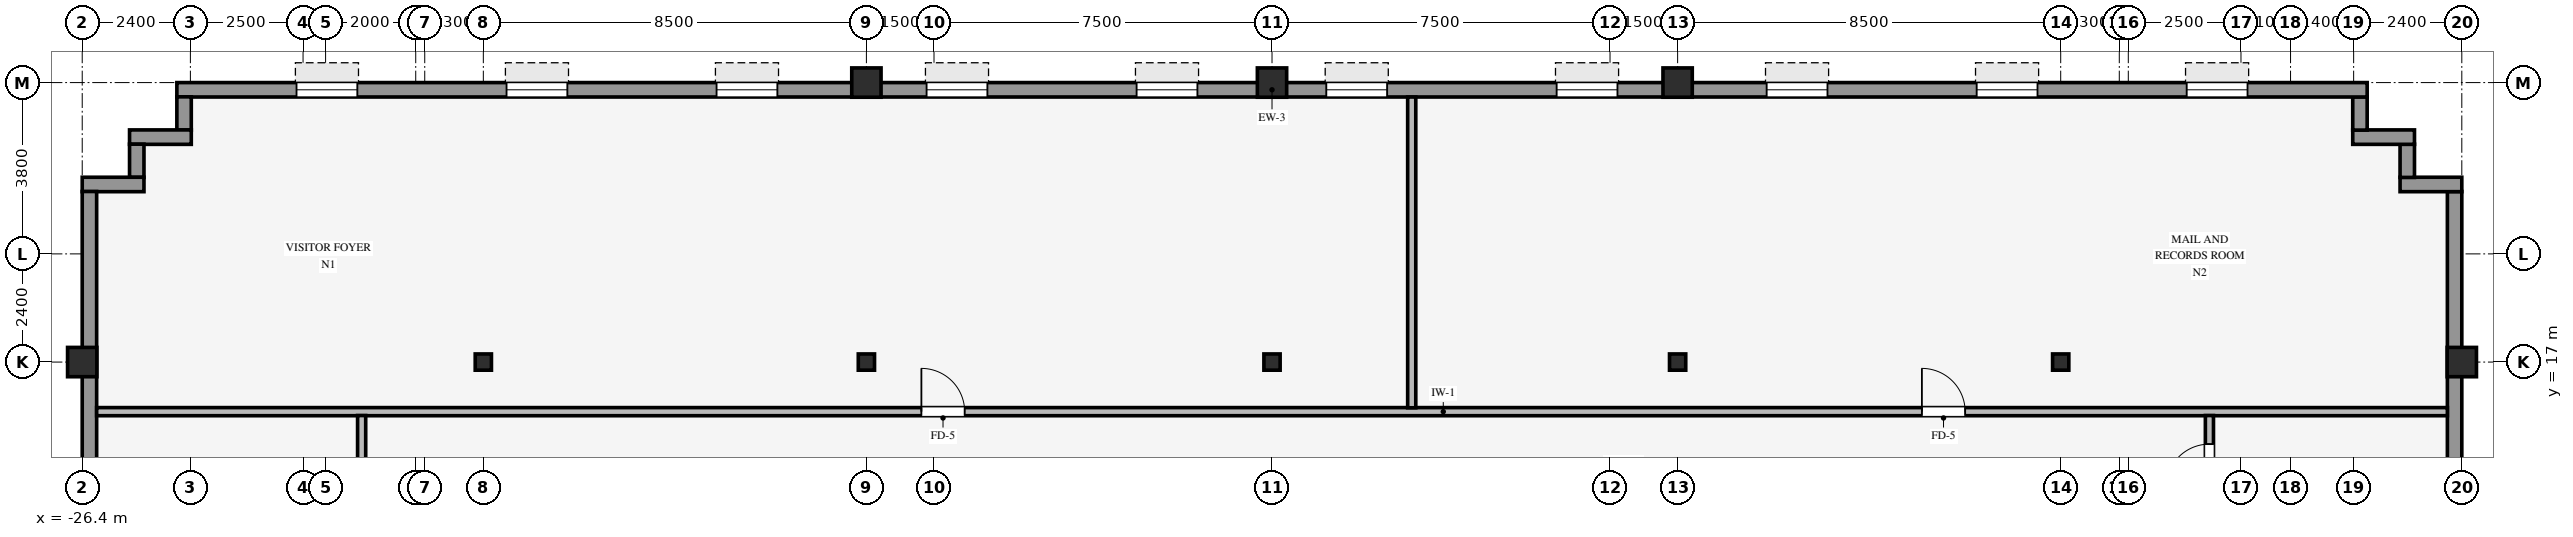
"""IFC4 building model, lengths in metres.
Left out: names, types, materials, properties, quantities, classifications, styles, units other than length and angle.
Written with IfcOpenShell. Run it as: python <this file> out.ifc"""

import sys

from ifc_helpers import new_model, si_unit, direction, frame, frame_2d, origin, origin_2d, place, context, subcontext, project, spatial, rectangle, hollow_rectangle, i_section, extrude, source, transform, mapped, element, fill, save


model = new_model("IFC4")
c1 = context("Model", 3, precision=1e-05, world=origin(), true_north=direction((0.0, 1.0)))
c2 = subcontext(c1, "Body", "Model", "MODEL_VIEW")
j1 = project(units=[si_unit("LENGTHUNIT", "METRE"), si_unit("PLANEANGLEUNIT", "RADIAN")], contexts=[c1])
p1 = place(None, origin())
s1 = spatial("IfcSite", under=j1, at=p1, CompositionType="ELEMENT")
p2 = place(p1, origin())
s2 = spatial("IfcBuilding", under=s1, at=p2, CompositionType="ELEMENT")
p3 = place(p2, frame((0.0, 0.0, 134.8)))
s3 = spatial("IfcBuildingStorey", under=s2, at=p3, CompositionType="ELEMENT", Elevation=134.8)
for number, where, z_axis, x_axis in (
    (1, (-26.4, 17.0, 0.0), (0.0, 0.0, 1.0), (1.0, 0.0, 0.0)),
    (2, (26.4, 17.0, 0.0), (0.0, 0.0, 1.0), (1.0, 0.0, 0.0)),
    (3, (-9.0, 23.2, 0.0), (0.0, 0.0, 1.0), (1.0, 0.0, 0.0)),
    (4, (0.0, 23.2, 0.0), (0.0, 0.0, 1.0), (1.0, 0.0, 0.0)),
    (5, (9.0, 23.2, 0.0), (0.0, 0.0, 1.0), (1.0, 0.0, 0.0)),
):
    element("IfcColumn", number, at=place(p3, frame(where, z_axis=z_axis, x_axis=x_axis)), inside=s3, PredefinedType="COLUMN", context=c2, shape_type="SweptSolid", body=[
        extrude(hollow_rectangle(XDim=0.65, YDim=0.65, WallThickness=0.04, InnerFilletRadius=0.04, OuterFilletRadius=0.08, at=origin_2d()), origin(), (0.0, 0.0, 1.0), 3.37),
    ])
for number, where, z_axis, x_axis in (
    (6, (0.0, 17.0, 0.0), (0.0, 0.0, 1.0), (1.0, 0.0, 0.0)),
    (7, (-17.5, 17.0, 0.0), (0.0, 0.0, 1.0), (1.0, 0.0, 0.0)),
    (8, (-9.0, 17.0, 0.0), (0.0, 0.0, 1.0), (1.0, 0.0, 0.0)),
    (9, (9.0, 17.0, 0.0), (0.0, 0.0, 1.0), (1.0, 0.0, 0.0)),
    (10, (17.5, 17.0, 0.0), (0.0, 0.0, 1.0), (1.0, 0.0, 0.0)),
):
    element("IfcColumn", number, at=place(p3, frame(where, z_axis=z_axis, x_axis=x_axis)), inside=s3, PredefinedType="COLUMN", context=c2, shape_type="SweptSolid", body=[
        extrude(i_section(OverallWidth=0.36, OverallDepth=0.36, WebThickness=0.021, FlangeThickness=0.021, FilletRadius=0.018, at=origin_2d()), origin(), (0.0, 0.0, 1.0), 3.37),
    ])
p4 = place(p3, frame((26.24, -20.784, 0.0), z_axis=(0.0, 0.0, 1.0), x_axis=(0.0, 1.0, 0.0)))
e11 = element("IfcWall", 11, at=p4, inside=s3, PredefinedType="STANDARD", context=c2, shape_type="SweptSolid", body=[
    extrude(rectangle(XDim=41.568, YDim=0.32, at=frame_2d((20.784, 0.0))), origin(), (0.0, 0.0, 1.0), 2.705),
])
p5 = place(p4, frame((7.369, 0.0, 0.8)))
e12 = element("IfcOpeningElement", 12, at=p5, cuts=e11, PredefinedType="OPENING", context=c2, shape_type="SweptSolid", body=[
    extrude(rectangle(XDim=2.1, YDim=1.56, at=frame_2d((1.05, 0.78))), frame((0.0, 0.17, 0.0), z_axis=(0.0, -1.0, 0.0), x_axis=(1.0, 0.0, 0.0)), (0.0, 0.0, 1.0), 0.34),
])
p6 = place(p4, frame((12.315, 0.0, 0.8)))
e13 = element("IfcOpeningElement", 13, at=p6, cuts=e11, PredefinedType="OPENING", context=c2, shape_type="SweptSolid", body=[
    extrude(rectangle(XDim=2.1, YDim=1.56, at=frame_2d((1.05, 0.78))), frame((0.0, 0.17, 0.0), z_axis=(0.0, -1.0, 0.0), x_axis=(1.0, 0.0, 0.0)), (0.0, 0.0, 1.0), 0.34),
])
p7 = place(p4, frame((17.711, 0.0, 0.8)))
e14 = element("IfcOpeningElement", 14, at=p7, cuts=e11, PredefinedType="OPENING", context=c2, shape_type="SweptSolid", body=[
    extrude(rectangle(XDim=2.1, YDim=1.56, at=frame_2d((1.05, 0.78))), frame((0.0, 0.17, 0.0), z_axis=(0.0, -1.0, 0.0), x_axis=(1.0, 0.0, 0.0)), (0.0, 0.0, 1.0), 0.34),
])
p8 = place(p4, frame((22.207, 0.0, 0.8)))
e15 = element("IfcOpeningElement", 15, at=p8, cuts=e11, PredefinedType="OPENING", context=c2, shape_type="SweptSolid", body=[
    extrude(rectangle(XDim=2.1, YDim=1.56, at=frame_2d((1.05, 0.78))), frame((0.0, 0.17, 0.0), z_axis=(0.0, -1.0, 0.0), x_axis=(1.0, 0.0, 0.0)), (0.0, 0.0, 1.0), 0.34),
])
p9 = place(p4, frame((27.153, 0.0, 0.8)))
e16 = element("IfcOpeningElement", 16, at=p9, cuts=e11, PredefinedType="OPENING", context=c2, shape_type="SweptSolid", body=[
    extrude(rectangle(XDim=2.1, YDim=1.56, at=frame_2d((1.05, 0.78))), frame((0.0, 0.17, 0.0), z_axis=(0.0, -1.0, 0.0), x_axis=(1.0, 0.0, 0.0)), (0.0, 0.0, 1.0), 0.34),
])
p10 = place(p4, frame((32.099, 0.0, 0.8)))
e17 = element("IfcOpeningElement", 17, at=p10, cuts=e11, PredefinedType="OPENING", context=c2, shape_type="SweptSolid", body=[
    extrude(rectangle(XDim=2.1, YDim=1.56, at=frame_2d((1.05, 0.78))), frame((0.0, 0.17, 0.0), z_axis=(0.0, -1.0, 0.0), x_axis=(1.0, 0.0, 0.0)), (0.0, 0.0, 1.0), 0.34),
])
p11 = place(p3, frame((25.03, 20.94, 0.0), z_axis=(0.0, 0.0, 1.0), x_axis=(1.0, 0.0, 0.0)))
e18 = element("IfcWall", 18, at=p11, inside=s3, PredefinedType="STANDARD", context=c2, shape_type="SweptSolid", body=[
    extrude(rectangle(XDim=1.37, YDim=0.32, at=frame_2d((0.685, 0.0))), origin(), (0.0, 0.0, 1.0), 3.36),
])
p12 = place(p3, frame((25.19, 21.096, 0.0), z_axis=(0.0, 0.0, 1.0), x_axis=(0.0, 1.0, 0.0)))
e19 = element("IfcWall", 19, at=p12, inside=s3, PredefinedType="STANDARD", context=c2, shape_type="SweptSolid", body=[
    extrude(rectangle(XDim=0.738, YDim=0.32, at=frame_2d((0.369, 0.0))), origin(), (0.0, 0.0, 1.0), 3.36),
])
p13 = place(p3, frame((23.98, 21.99, 0.0), z_axis=(0.0, 0.0, 1.0), x_axis=(1.0, 0.0, 0.0)))
e20 = element("IfcWall", 20, at=p13, inside=s3, PredefinedType="STANDARD", context=c2, shape_type="SweptSolid", body=[
    extrude(rectangle(XDim=1.37, YDim=0.32, at=frame_2d((0.685, 0.0))), origin(), (0.0, 0.0, 1.0), 3.36),
])
p14 = place(p3, frame((24.14, 22.146, 0.0), z_axis=(0.0, 0.0, 1.0), x_axis=(0.0, 1.0, 0.0)))
e21 = element("IfcWall", 21, at=p14, inside=s3, PredefinedType="STANDARD", context=c2, shape_type="SweptSolid", body=[
    extrude(rectangle(XDim=0.738, YDim=0.32, at=frame_2d((0.369, 0.0))), origin(), (0.0, 0.0, 1.0), 3.36),
])
p15 = place(p3, frame((-24.3, 23.04, 0.0), z_axis=(0.0, 0.0, 1.0), x_axis=(1.0, 0.0, 0.0)))
e22 = element("IfcWall", 22, at=p15, inside=s3, PredefinedType="STANDARD", context=c2, shape_type="SweptSolid", body=[
    extrude(rectangle(XDim=48.6, YDim=0.32, at=frame_2d((24.3, 0.0))), origin(), (0.0, 0.0, 1.0), 2.705),
])
p16 = place(p15, frame((2.655, 0.0, 0.8)))
e23 = element("IfcOpeningElement", 23, at=p16, cuts=e22, PredefinedType="OPENING", context=c2, shape_type="SweptSolid", body=[
    extrude(rectangle(XDim=1.35, YDim=1.56, at=frame_2d((0.675, 0.78))), frame((0.0, 0.17, 0.0), z_axis=(0.0, -1.0, 0.0), x_axis=(1.0, 0.0, 0.0)), (0.0, 0.0, 1.0), 0.34),
])
p17 = place(p15, frame((7.315, 0.0, 0.8)))
e24 = element("IfcOpeningElement", 24, at=p17, cuts=e22, PredefinedType="OPENING", context=c2, shape_type="SweptSolid", body=[
    extrude(rectangle(XDim=1.35, YDim=1.56, at=frame_2d((0.675, 0.78))), frame((0.0, 0.17, 0.0), z_axis=(0.0, -1.0, 0.0), x_axis=(1.0, 0.0, 0.0)), (0.0, 0.0, 1.0), 0.34),
])
p18 = place(p15, frame((11.975, 0.0, 0.8)))
e25 = element("IfcOpeningElement", 25, at=p18, cuts=e22, PredefinedType="OPENING", context=c2, shape_type="SweptSolid", body=[
    extrude(rectangle(XDim=1.35, YDim=1.56, at=frame_2d((0.675, 0.78))), frame((0.0, 0.17, 0.0), z_axis=(0.0, -1.0, 0.0), x_axis=(1.0, 0.0, 0.0)), (0.0, 0.0, 1.0), 0.34),
])
p19 = place(p15, frame((16.635, 0.0, 0.8)))
e26 = element("IfcOpeningElement", 26, at=p19, cuts=e22, PredefinedType="OPENING", context=c2, shape_type="SweptSolid", body=[
    extrude(rectangle(XDim=1.35, YDim=1.56, at=frame_2d((0.675, 0.78))), frame((0.0, 0.17, 0.0), z_axis=(0.0, -1.0, 0.0), x_axis=(1.0, 0.0, 0.0)), (0.0, 0.0, 1.0), 0.34),
])
p20 = place(p15, frame((21.295, 0.0, 0.8)))
e27 = element("IfcOpeningElement", 27, at=p20, cuts=e22, PredefinedType="OPENING", context=c2, shape_type="SweptSolid", body=[
    extrude(rectangle(XDim=1.35, YDim=1.56, at=frame_2d((0.675, 0.78))), frame((0.0, 0.17, 0.0), z_axis=(0.0, -1.0, 0.0), x_axis=(1.0, 0.0, 0.0)), (0.0, 0.0, 1.0), 0.34),
])
p21 = place(p15, frame((25.505, 0.0, 0.8)))
e28 = element("IfcOpeningElement", 28, at=p21, cuts=e22, PredefinedType="OPENING", context=c2, shape_type="SweptSolid", body=[
    extrude(rectangle(XDim=1.35, YDim=1.56, at=frame_2d((0.675, 0.78))), frame((0.0, 0.17, 0.0), z_axis=(0.0, -1.0, 0.0), x_axis=(1.0, 0.0, 0.0)), (0.0, 0.0, 1.0), 0.34),
])
p22 = place(p15, frame((30.615, 0.0, 0.8)))
e29 = element("IfcOpeningElement", 29, at=p22, cuts=e22, PredefinedType="OPENING", context=c2, shape_type="SweptSolid", body=[
    extrude(rectangle(XDim=1.35, YDim=1.56, at=frame_2d((0.675, 0.78))), frame((0.0, 0.17, 0.0), z_axis=(0.0, -1.0, 0.0), x_axis=(1.0, 0.0, 0.0)), (0.0, 0.0, 1.0), 0.34),
])
p23 = place(p15, frame((35.275, 0.0, 0.8)))
e30 = element("IfcOpeningElement", 30, at=p23, cuts=e22, PredefinedType="OPENING", context=c2, shape_type="SweptSolid", body=[
    extrude(rectangle(XDim=1.35, YDim=1.56, at=frame_2d((0.675, 0.78))), frame((0.0, 0.17, 0.0), z_axis=(0.0, -1.0, 0.0), x_axis=(1.0, 0.0, 0.0)), (0.0, 0.0, 1.0), 0.34),
])
p24 = place(p15, frame((39.935, 0.0, 0.8)))
e31 = element("IfcOpeningElement", 31, at=p24, cuts=e22, PredefinedType="OPENING", context=c2, shape_type="SweptSolid", body=[
    extrude(rectangle(XDim=1.35, YDim=1.56, at=frame_2d((0.675, 0.78))), frame((0.0, 0.17, 0.0), z_axis=(0.0, -1.0, 0.0), x_axis=(1.0, 0.0, 0.0)), (0.0, 0.0, 1.0), 0.34),
])
p25 = place(p15, frame((44.595, 0.0, 0.8)))
e32 = element("IfcOpeningElement", 32, at=p25, cuts=e22, PredefinedType="OPENING", context=c2, shape_type="SweptSolid", body=[
    extrude(rectangle(XDim=1.35, YDim=1.56, at=frame_2d((0.675, 0.78))), frame((0.0, 0.17, 0.0), z_axis=(0.0, -1.0, 0.0), x_axis=(1.0, 0.0, 0.0)), (0.0, 0.0, 1.0), 0.34),
])
p26 = place(p3, frame((-24.14, 22.146, 0.0), z_axis=(0.0, 0.0, 1.0), x_axis=(0.0, 1.0, 0.0)))
e33 = element("IfcWall", 33, at=p26, inside=s3, PredefinedType="STANDARD", context=c2, shape_type="SweptSolid", body=[
    extrude(rectangle(XDim=0.738, YDim=0.32, at=frame_2d((0.369, 0.0))), origin(), (0.0, 0.0, 1.0), 3.36),
])
p27 = place(p3, frame((-25.35, 21.99, 0.0), z_axis=(0.0, 0.0, 1.0), x_axis=(1.0, 0.0, 0.0)))
e34 = element("IfcWall", 34, at=p27, inside=s3, PredefinedType="STANDARD", context=c2, shape_type="SweptSolid", body=[
    extrude(rectangle(XDim=1.37, YDim=0.32, at=frame_2d((0.685, 0.0))), origin(), (0.0, 0.0, 1.0), 3.36),
])
p28 = place(p3, frame((-25.19, 21.096, 0.0), z_axis=(0.0, 0.0, 1.0), x_axis=(0.0, 1.0, 0.0)))
e35 = element("IfcWall", 35, at=p28, inside=s3, PredefinedType="STANDARD", context=c2, shape_type="SweptSolid", body=[
    extrude(rectangle(XDim=0.738, YDim=0.32, at=frame_2d((0.369, 0.0))), origin(), (0.0, 0.0, 1.0), 3.36),
])
p29 = place(p3, frame((-26.4, 20.94, 0.0), z_axis=(0.0, 0.0, 1.0), x_axis=(1.0, 0.0, 0.0)))
e36 = element("IfcWall", 36, at=p29, inside=s3, PredefinedType="STANDARD", context=c2, shape_type="SweptSolid", body=[
    extrude(rectangle(XDim=1.37, YDim=0.32, at=frame_2d((0.685, 0.0))), origin(), (0.0, 0.0, 1.0), 3.36),
])
p30 = place(p3, frame((-26.24, -20.784, 0.0), z_axis=(0.0, 0.0, 1.0), x_axis=(0.0, 1.0, 0.0)))
e37 = element("IfcWall", 37, at=p30, inside=s3, PredefinedType="STANDARD", context=c2, shape_type="SweptSolid", body=[
    extrude(rectangle(XDim=41.568, YDim=0.32, at=frame_2d((20.784, 0.0))), origin(), (0.0, 0.0, 1.0), 2.705),
])
p31 = place(p30, frame((7.369, 0.0, 0.8)))
e38 = element("IfcOpeningElement", 38, at=p31, cuts=e37, PredefinedType="OPENING", context=c2, shape_type="SweptSolid", body=[
    extrude(rectangle(XDim=2.1, YDim=1.56, at=frame_2d((1.05, 0.78))), frame((0.0, 0.17, 0.0), z_axis=(0.0, -1.0, 0.0), x_axis=(1.0, 0.0, 0.0)), (0.0, 0.0, 1.0), 0.34),
])
p32 = place(p30, frame((12.315, 0.0, 0.8)))
e39 = element("IfcOpeningElement", 39, at=p32, cuts=e37, PredefinedType="OPENING", context=c2, shape_type="SweptSolid", body=[
    extrude(rectangle(XDim=2.1, YDim=1.56, at=frame_2d((1.05, 0.78))), frame((0.0, 0.17, 0.0), z_axis=(0.0, -1.0, 0.0), x_axis=(1.0, 0.0, 0.0)), (0.0, 0.0, 1.0), 0.34),
])
p33 = place(p30, frame((17.711, 0.0, 0.8)))
e40 = element("IfcOpeningElement", 40, at=p33, cuts=e37, PredefinedType="OPENING", context=c2, shape_type="SweptSolid", body=[
    extrude(rectangle(XDim=2.1, YDim=1.56, at=frame_2d((1.05, 0.78))), frame((0.0, 0.17, 0.0), z_axis=(0.0, -1.0, 0.0), x_axis=(1.0, 0.0, 0.0)), (0.0, 0.0, 1.0), 0.34),
])
p34 = place(p30, frame((22.207, 0.0, 0.8)))
e41 = element("IfcOpeningElement", 41, at=p34, cuts=e37, PredefinedType="OPENING", context=c2, shape_type="SweptSolid", body=[
    extrude(rectangle(XDim=2.1, YDim=1.56, at=frame_2d((1.05, 0.78))), frame((0.0, 0.17, 0.0), z_axis=(0.0, -1.0, 0.0), x_axis=(1.0, 0.0, 0.0)), (0.0, 0.0, 1.0), 0.34),
])
p35 = place(p30, frame((27.153, 0.0, 0.8)))
e42 = element("IfcOpeningElement", 42, at=p35, cuts=e37, PredefinedType="OPENING", context=c2, shape_type="SweptSolid", body=[
    extrude(rectangle(XDim=2.1, YDim=1.56, at=frame_2d((1.05, 0.78))), frame((0.0, 0.17, 0.0), z_axis=(0.0, -1.0, 0.0), x_axis=(1.0, 0.0, 0.0)), (0.0, 0.0, 1.0), 0.34),
])
p36 = place(p30, frame((32.099, 0.0, 0.8)))
e43 = element("IfcOpeningElement", 43, at=p36, cuts=e37, PredefinedType="OPENING", context=c2, shape_type="SweptSolid", body=[
    extrude(rectangle(XDim=2.1, YDim=1.56, at=frame_2d((1.05, 0.78))), frame((0.0, 0.17, 0.0), z_axis=(0.0, -1.0, 0.0), x_axis=(1.0, 0.0, 0.0)), (0.0, 0.0, 1.0), 0.34),
])
p37 = place(p3, frame((-26.08, 15.9, 0.0), z_axis=(0.0, 0.0, 1.0), x_axis=(1.0, 0.0, 0.0)))
e44 = element("IfcWall", 44, at=p37, inside=s3, PredefinedType="PARTITIONING", context=c2, shape_type="SweptSolid", body=[
    extrude(rectangle(XDim=52.16, YDim=0.18, at=frame_2d((26.08, 0.0))), origin(), (0.0, 0.0, 1.0), 3.36),
])
p38 = place(p37, frame((18.3, 0.0, 0.0)))
e45 = element("IfcOpeningElement", 45, at=p38, cuts=e44, PredefinedType="OPENING", context=c2, shape_type="SweptSolid", body=[
    extrude(rectangle(XDim=0.96, YDim=2.1, at=frame_2d((0.48, 1.05))), frame((0.0, 0.1, 0.0), z_axis=(0.0, -1.0, 0.0), x_axis=(1.0, 0.0, 0.0)), (0.0, 0.0, 1.0), 0.2),
])
p39 = place(p37, frame((40.5, 0.0, 0.0)))
e46 = element("IfcOpeningElement", 46, at=p39, cuts=e44, PredefinedType="OPENING", context=c2, shape_type="SweptSolid", body=[
    extrude(rectangle(XDim=0.96, YDim=2.1, at=frame_2d((0.48, 1.05))), frame((0.0, 0.1, 0.0), z_axis=(0.0, -1.0, 0.0), x_axis=(1.0, 0.0, 0.0)), (0.0, 0.0, 1.0), 0.2),
])
p40 = place(p3, frame((-20.2, -15.814, 0.0), z_axis=(0.0, 0.0, 1.0), x_axis=(0.0, 1.0, 0.0)))
e47 = element("IfcWall", 47, at=p40, inside=s3, PredefinedType="PARTITIONING", context=c2, shape_type="SweptSolid", body=[
    extrude(rectangle(XDim=31.628, YDim=0.18, at=frame_2d((15.814, 0.0))), origin(), (0.0, 0.0, 1.0), 3.36),
])
p41 = place(p40, frame((20.334, 0.0, 0.0)))
e48 = element("IfcOpeningElement", 48, at=p41, cuts=e47, PredefinedType="OPENING", context=c2, shape_type="SweptSolid", body=[
    extrude(rectangle(XDim=0.96, YDim=2.1, at=frame_2d((0.48, 1.05))), frame((0.0, 0.1, 0.0), z_axis=(0.0, -1.0, 0.0), x_axis=(1.0, 0.0, 0.0)), (0.0, 0.0, 1.0), 0.2),
])
p42 = place(p40, frame((6.834, 0.0, 0.0)))
e49 = element("IfcOpeningElement", 49, at=p42, cuts=e47, PredefinedType="OPENING", context=c2, shape_type="SweptSolid", body=[
    extrude(rectangle(XDim=0.96, YDim=2.1, at=frame_2d((0.48, 1.05))), frame((0.0, 0.1, 0.0), z_axis=(0.0, -1.0, 0.0), x_axis=(1.0, 0.0, 0.0)), (0.0, 0.0, 1.0), 0.2),
])
p43 = place(p3, frame((3.1, 15.986, 0.0), z_axis=(0.0, 0.0, 1.0), x_axis=(0.0, 1.0, 0.0)))
e50 = element("IfcWall", 50, at=p43, inside=s3, PredefinedType="PARTITIONING", context=c2, shape_type="SweptSolid", body=[
    extrude(rectangle(XDim=6.894, YDim=0.18, at=frame_2d((3.447, 0.0))), origin(), (0.0, 0.0, 1.0), 3.36),
])
p44 = place(p3, frame((20.8, 13.586, 0.0), z_axis=(0.0, 0.0, 1.0), x_axis=(0.0, 1.0, 0.0)))
e51 = element("IfcWall", 51, at=p44, inside=s3, PredefinedType="PARTITIONING", context=c2, shape_type="SweptSolid", body=[
    extrude(rectangle(XDim=2.228, YDim=0.18, at=frame_2d((1.114, 0.0))), origin(), (0.0, 0.0, 1.0), 3.36),
])
p45 = place(p44, frame((0.634, 0.0, 0.0)))
e52 = element("IfcOpeningElement", 52, at=p45, cuts=e51, PredefinedType="OPENING", context=c2, shape_type="SweptSolid", body=[
    extrude(rectangle(XDim=0.96, YDim=2.1, at=frame_2d((0.48, 1.05))), frame((0.0, 0.1, 0.0), z_axis=(0.0, -1.0, 0.0), x_axis=(1.0, 0.0, 0.0)), (0.0, 0.0, 1.0), 0.2),
])
m1 = source(origin(), c2, "Body", "SweptSolid", [
    extrude(rectangle(XDim=1.35, YDim=1.56, at=frame_2d((0.675, 0.78))), frame((0.0, 0.03, 0.0), z_axis=(0.0, -1.0, 0.0), x_axis=(1.0, 0.0, 0.0)), (0.0, 0.0, 1.0), 0.06),
])
p46 = place(p16, origin())
e53 = element("IfcWindow", 53, at=p46, inside=s3, PartitioningType="SINGLE_PANEL", PredefinedType="WINDOW", context=c2, shape_type="MappedRepresentation", body=[
    mapped(m1, transform((0.0, 0.0, 0.0), scale=1.0)),
])
fill(e23, e53)
p47 = place(p17, origin())
e54 = element("IfcWindow", 54, at=p47, inside=s3, PartitioningType="SINGLE_PANEL", PredefinedType="WINDOW", context=c2, shape_type="MappedRepresentation", body=[
    mapped(m1, transform((0.0, 0.0, 0.0), scale=1.0)),
])
fill(e24, e54)
p48 = place(p18, origin())
e55 = element("IfcWindow", 55, at=p48, inside=s3, PartitioningType="SINGLE_PANEL", PredefinedType="WINDOW", context=c2, shape_type="MappedRepresentation", body=[
    mapped(m1, transform((0.0, 0.0, 0.0), scale=1.0)),
])
fill(e25, e55)
p49 = place(p19, origin())
e56 = element("IfcWindow", 56, at=p49, inside=s3, PartitioningType="SINGLE_PANEL", PredefinedType="WINDOW", context=c2, shape_type="MappedRepresentation", body=[
    mapped(m1, transform((0.0, 0.0, 0.0), scale=1.0)),
])
fill(e26, e56)
p50 = place(p20, origin())
e57 = element("IfcWindow", 57, at=p50, inside=s3, PartitioningType="SINGLE_PANEL", PredefinedType="WINDOW", context=c2, shape_type="MappedRepresentation", body=[
    mapped(m1, transform((0.0, 0.0, 0.0), scale=1.0)),
])
fill(e27, e57)
p51 = place(p21, origin())
e58 = element("IfcWindow", 58, at=p51, inside=s3, PartitioningType="SINGLE_PANEL", PredefinedType="WINDOW", context=c2, shape_type="MappedRepresentation", body=[
    mapped(m1, transform((0.0, 0.0, 0.0), scale=1.0)),
])
fill(e28, e58)
p52 = place(p22, origin())
e59 = element("IfcWindow", 59, at=p52, inside=s3, PartitioningType="SINGLE_PANEL", PredefinedType="WINDOW", context=c2, shape_type="MappedRepresentation", body=[
    mapped(m1, transform((0.0, 0.0, 0.0), scale=1.0)),
])
fill(e29, e59)
p53 = place(p23, origin())
e60 = element("IfcWindow", 60, at=p53, inside=s3, PartitioningType="SINGLE_PANEL", PredefinedType="WINDOW", context=c2, shape_type="MappedRepresentation", body=[
    mapped(m1, transform((0.0, 0.0, 0.0), scale=1.0)),
])
fill(e30, e60)
p54 = place(p24, origin())
e61 = element("IfcWindow", 61, at=p54, inside=s3, PartitioningType="SINGLE_PANEL", PredefinedType="WINDOW", context=c2, shape_type="MappedRepresentation", body=[
    mapped(m1, transform((0.0, 0.0, 0.0), scale=1.0)),
])
fill(e31, e61)
p55 = place(p25, origin())
e62 = element("IfcWindow", 62, at=p55, inside=s3, PartitioningType="SINGLE_PANEL", PredefinedType="WINDOW", context=c2, shape_type="MappedRepresentation", body=[
    mapped(m1, transform((0.0, 0.0, 0.0), scale=1.0)),
])
fill(e32, e62)
m2 = source(origin(), c2, "Body", "SweptSolid", [
    extrude(rectangle(XDim=0.96, YDim=2.1, at=frame_2d((0.48, 1.05))), frame((0.0, 0.025, 0.0), z_axis=(0.0, -1.0, 0.0), x_axis=(1.0, 0.0, 0.0)), (0.0, 0.0, 1.0), 0.05),
])
p56 = place(p38, origin())
e63 = element("IfcDoor", 63, at=p56, inside=s3, OperationType="SINGLE_SWING_LEFT", PredefinedType="DOOR", context=c2, shape_type="MappedRepresentation", body=[
    mapped(m2, transform((0.0, 0.0, 0.0), scale=1.0)),
])
fill(e45, e63)
p57 = place(p39, origin())
e64 = element("IfcDoor", 64, at=p57, inside=s3, OperationType="SINGLE_SWING_LEFT", PredefinedType="DOOR", context=c2, shape_type="MappedRepresentation", body=[
    mapped(m2, transform((0.0, 0.0, 0.0), scale=1.0)),
])
fill(e46, e64)
p58 = place(p45, origin())
e65 = element("IfcDoor", 65, at=p58, inside=s3, OperationType="SINGLE_SWING_LEFT", PredefinedType="DOOR", context=c2, shape_type="MappedRepresentation", body=[
    mapped(m2, transform((0.0, 0.0, 0.0), scale=1.0)),
])
fill(e52, e65)
save(model, sys.argv[1])
